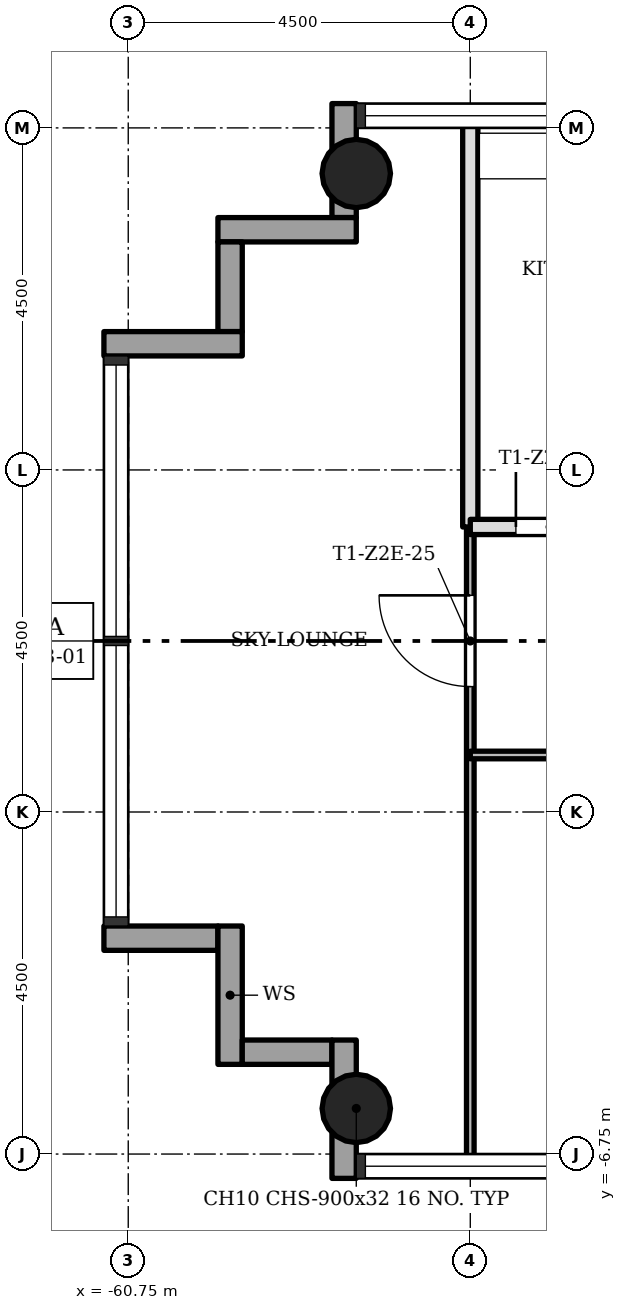
"""IFC4 building model, lengths in metres.
Left out: names, types, materials, properties, quantities, classifications, styles, units other than length and angle.
Written with IfcOpenShell. Run it as: python <this file> out.ifc"""

import sys

from ifc_helpers import new_model, si_unit, direction, frame, frame_2d, origin, origin_2d, place, context, subcontext, project, spatial, rectangle, hollow_circle, extrude, element, fill, save


model = new_model("IFC4")
c1 = context("Model", 3, precision=1e-05, world=origin(), true_north=direction((0.0, 1.0)))
c2 = subcontext(c1, "Body", "Model", "MODEL_VIEW")
j1 = project(units=[si_unit("LENGTHUNIT", "METRE"), si_unit("PLANEANGLEUNIT", "RADIAN")], contexts=[c1])
p1 = place(None, origin())
s1 = spatial("IfcSite", under=j1, at=p1, CompositionType="ELEMENT")
p2 = place(p1, origin())
s2 = spatial("IfcBuilding", under=s1, at=p2, CompositionType="ELEMENT")
p3 = place(p2, frame((0.0, 0.0, 103.8)))
s3 = spatial("IfcBuildingStorey", under=s2, at=p3, CompositionType="ELEMENT", Elevation=103.8)
for number, where, z_axis, x_axis in (
    (1, (-57.75, -6.15, 0.0), (0.0, 0.0, 1.0), (1.0, 0.0, 0.0)),
    (2, (-57.75, 6.15, 0.0), (0.0, 0.0, 1.0), (1.0, 0.0, 0.0)),
):
    element("IfcColumn", number, at=place(p3, frame(where, z_axis=z_axis, x_axis=x_axis)), inside=s3, PredefinedType="COLUMN", context=c2, shape_type="SweptSolid", body=[
        extrude(hollow_circle(Radius=0.45, WallThickness=0.032, at=origin_2d()), origin(), (0.0, 0.0, 1.0), 3.4),
    ])
p4 = place(p3, frame((-61.07, -3.91, -0.3), z_axis=(0.0, 0.0, 1.0), x_axis=(1.0, 0.0, 0.0)))
e3 = element("IfcWall", 3, at=p4, inside=s3, PredefinedType="STANDARD", context=c2, shape_type="SweptSolid", body=[
    extrude(rectangle(XDim=1.5, YDim=0.32, at=frame_2d((0.75, 0.0))), origin(), (0.0, 0.0, 1.0), 3.4),
])
p5 = place(p3, frame((-59.41, -3.75, -0.3), z_axis=(0.0, 0.0, 1.0), x_axis=(0.0, -1.0, 0.0)))
e4 = element("IfcWall", 4, at=p5, inside=s3, PredefinedType="STANDARD", context=c2, shape_type="SweptSolid", body=[
    extrude(rectangle(XDim=1.82, YDim=0.32, at=frame_2d((0.91, 0.0))), origin(), (0.0, 0.0, 1.0), 3.4),
])
p6 = place(p3, frame((-59.25, -5.41, -0.3), z_axis=(0.0, 0.0, 1.0), x_axis=(1.0, 0.0, 0.0)))
e5 = element("IfcWall", 5, at=p6, inside=s3, PredefinedType="STANDARD", context=c2, shape_type="SweptSolid", body=[
    extrude(rectangle(XDim=1.18, YDim=0.32, at=frame_2d((0.59, 0.0))), origin(), (0.0, 0.0, 1.0), 3.4),
])
p7 = place(p3, frame((-57.91, -5.25, -0.3), z_axis=(0.0, 0.0, 1.0), x_axis=(0.0, -1.0, 0.0)))
e6 = element("IfcWall", 6, at=p7, inside=s3, PredefinedType="STANDARD", context=c2, shape_type="SweptSolid", body=[
    extrude(rectangle(XDim=1.82, YDim=0.32, at=frame_2d((0.91, 0.0))), origin(), (0.0, 0.0, 1.0), 3.4),
])
p8 = place(p3, frame((-57.91, 7.07, -0.3), z_axis=(0.0, 0.0, 1.0), x_axis=(0.0, -1.0, 0.0)))
e7 = element("IfcWall", 7, at=p8, inside=s3, PredefinedType="STANDARD", context=c2, shape_type="SweptSolid", body=[
    extrude(rectangle(XDim=1.5, YDim=0.32, at=frame_2d((0.75, 0.0))), origin(), (0.0, 0.0, 1.0), 3.4),
])
p9 = place(p3, frame((-57.75, 5.41, -0.3), z_axis=(0.0, 0.0, 1.0), x_axis=(-1.0, 0.0, 0.0)))
e8 = element("IfcWall", 8, at=p9, inside=s3, PredefinedType="STANDARD", context=c2, shape_type="SweptSolid", body=[
    extrude(rectangle(XDim=1.82, YDim=0.32, at=frame_2d((0.91, 0.0))), origin(), (0.0, 0.0, 1.0), 3.4),
])
p10 = place(p3, frame((-59.41, 5.25, -0.3), z_axis=(0.0, 0.0, 1.0), x_axis=(0.0, -1.0, 0.0)))
e9 = element("IfcWall", 9, at=p10, inside=s3, PredefinedType="STANDARD", context=c2, shape_type="SweptSolid", body=[
    extrude(rectangle(XDim=1.18, YDim=0.32, at=frame_2d((0.59, 0.0))), origin(), (0.0, 0.0, 1.0), 3.4),
])
p11 = place(p3, frame((-59.25, 3.91, -0.3), z_axis=(0.0, 0.0, 1.0), x_axis=(-1.0, 0.0, 0.0)))
e10 = element("IfcWall", 10, at=p11, inside=s3, PredefinedType="STANDARD", context=c2, shape_type="SweptSolid", body=[
    extrude(rectangle(XDim=1.82, YDim=0.32, at=frame_2d((0.91, 0.0))), origin(), (0.0, 0.0, 1.0), 3.4),
])
p12 = place(p3, frame((-56.25, -6.85, 0.0), z_axis=(0.0, 0.0, 1.0), x_axis=(0.0, 1.0, 0.0)))
e11 = element("IfcWall", 11, at=p12, inside=s3, PredefinedType="PARTITIONING", context=c2, shape_type="SweptSolid", body=[
    extrude(rectangle(XDim=8.35, YDim=0.1, at=frame_2d((4.175, 0.0))), origin(), (0.0, 0.0, 1.0), 3.0),
])
p13 = place(p12, frame((6.25, 0.0, 0.0)))
e12 = element("IfcOpeningElement", 12, at=p13, cuts=e11, PredefinedType="OPENING", context=c2, shape_type="SweptSolid", body=[
    extrude(rectangle(XDim=1.2, YDim=2.1, at=frame_2d((0.6, 1.05))), frame((0.0, 0.06, 0.0), z_axis=(0.0, -1.0, 0.0), x_axis=(1.0, 0.0, 0.0)), (0.0, 0.0, 1.0), 0.12),
])
p14 = place(p3, frame((-56.25, 1.5, 0.0), z_axis=(0.0, 0.0, 1.0), x_axis=(0.0, 1.0, 0.0)))
e13 = element("IfcWall", 13, at=p14, inside=s3, PredefinedType="SOLIDWALL", context=c2, shape_type="SweptSolid", body=[
    extrude(rectangle(XDim=5.35, YDim=0.2, at=frame_2d((2.675, 0.0))), origin(), (0.0, 0.0, 1.0), 3.0),
])
p15 = place(p3, frame((-56.25, -1.5, 0.0), z_axis=(0.0, 0.0, 1.0), x_axis=(1.0, 0.0, 0.0)))
e14 = element("IfcWall", 14, at=p15, inside=s3, PredefinedType="PARTITIONING", context=c2, shape_type="SweptSolid", body=[
    extrude(rectangle(XDim=4.5, YDim=0.1, at=frame_2d((2.25, 0.0))), origin(), (0.0, 0.0, 1.0), 3.0),
])
p16 = place(p15, frame((1.8, 0.0, 0.0)))
e15 = element("IfcOpeningElement", 15, at=p16, cuts=e14, PredefinedType="OPENING", context=c2, shape_type="SweptSolid", body=[
    extrude(rectangle(XDim=0.9, YDim=2.1, at=frame_2d((0.45, 1.05))), frame((0.0, 0.06, 0.0), z_axis=(0.0, -1.0, 0.0), x_axis=(1.0, 0.0, 0.0)), (0.0, 0.0, 1.0), 0.12),
])
p17 = place(p3, frame((-56.25, 1.5, 0.0), z_axis=(0.0, 0.0, 1.0), x_axis=(1.0, 0.0, 0.0)))
e16 = element("IfcWall", 16, at=p17, inside=s3, PredefinedType="SOLIDWALL", context=c2, shape_type="SweptSolid", body=[
    extrude(rectangle(XDim=4.5, YDim=0.2, at=frame_2d((2.25, 0.0))), origin(), (0.0, 0.0, 1.0), 3.0),
])
p18 = place(p17, frame((0.6, 0.0, 0.0)))
e17 = element("IfcOpeningElement", 17, at=p18, cuts=e16, PredefinedType="OPENING", context=c2, shape_type="SweptSolid", body=[
    extrude(rectangle(XDim=0.9, YDim=2.1, at=frame_2d((0.45, 1.05))), frame((0.0, 0.11, 0.0), z_axis=(0.0, -1.0, 0.0), x_axis=(1.0, 0.0, 0.0)), (0.0, 0.0, 1.0), 0.22),
])
p19 = place(p18, origin())
e18 = element("IfcDoor", 18, at=p19, inside=s3, OperationType="SINGLE_SWING_RIGHT", PredefinedType="DOOR", context=c2, shape_type="SweptSolid", body=[
    extrude(rectangle(XDim=0.9, YDim=2.1, at=frame_2d((0.45, 1.05))), frame((0.0, 0.025, 0.0), z_axis=(0.0, -1.0, 0.0), x_axis=(1.0, 0.0, 0.0)), (0.0, 0.0, 1.0), 0.05),
])
fill(e17, e18)
p20 = place(p13, origin())
e19 = element("IfcDoor", 19, at=p20, inside=s3, OperationType="SINGLE_SWING_LEFT", PredefinedType="DOOR", context=c2, shape_type="SweptSolid", body=[
    extrude(rectangle(XDim=1.2, YDim=2.1, at=frame_2d((0.6, 1.05))), frame((0.0, 0.025, 0.0), z_axis=(0.0, -1.0, 0.0), x_axis=(1.0, 0.0, 0.0)), (0.0, 0.0, 1.0), 0.05),
])
fill(e12, e19)
save(model, sys.argv[1])
